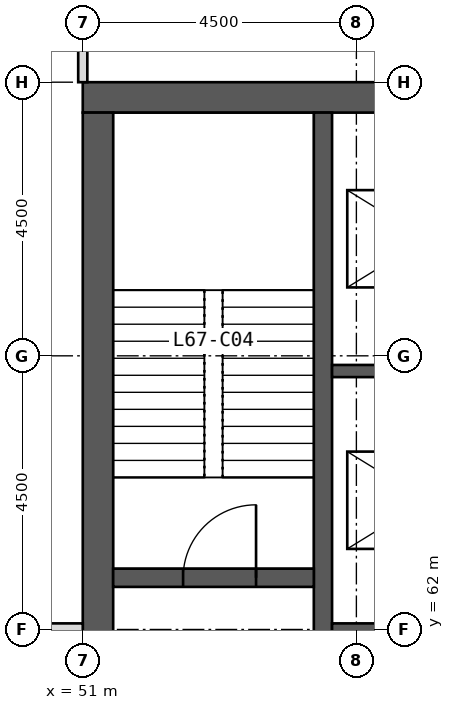
"""IFC4 building model, lengths in metres.
Left out: names, types, materials, properties, quantities, classifications, styles, units other than length and angle.
Written with IfcOpenShell. Run it as: python <this file> out.ifc"""

import sys

from ifc_helpers import new_model, si_unit, direction, frame, frame_2d, origin, place, context, subcontext, project, spatial, rectangle, extrude, element, fill, save


model = new_model("IFC4")
c1 = context("Model", 3, precision=1e-05, world=origin(), true_north=direction((0.0, 1.0)))
c2 = subcontext(c1, "Body", "Model", "MODEL_VIEW")
j1 = project(units=[si_unit("LENGTHUNIT", "METRE"), si_unit("PLANEANGLEUNIT", "RADIAN")], contexts=[c1])
p1 = place(None, origin())
s1 = spatial("IfcSite", under=j1, at=p1, CompositionType="ELEMENT")
p2 = place(p1, origin())
s2 = spatial("IfcBuilding", under=s1, at=p2, CompositionType="ELEMENT")
p3 = place(p2, frame((0.0, 0.0, 278.0)))
s3 = spatial("IfcBuildingStorey", under=s2, at=p3, CompositionType="ELEMENT", Elevation=278.0)
p4 = place(p3, frame((51.0, 70.75, 0.0), z_axis=(0.0, 0.0, 1.0), x_axis=(1.0, 0.0, 0.0)))
e1 = element("IfcWall", 1, at=p4, inside=s3, PredefinedType="SHEAR", context=c2, shape_type="SweptSolid", body=[
    extrude(rectangle(XDim=18.0, YDim=0.5, at=frame_2d((9.0, 0.0))), origin(), (0.0, 0.0, 1.0), 4.0),
])
p5 = place(p4, frame((8.1, 0.0, 0.0)))
e2 = element("IfcOpeningElement", 2, at=p5, cuts=e1, PredefinedType="OPENING", context=c2, shape_type="SweptSolid", body=[
    extrude(rectangle(XDim=1.8, YDim=2.2, at=frame_2d((0.9, 1.1))), frame((0.0, 0.26, 0.0), z_axis=(0.0, -1.0, 0.0), x_axis=(1.0, 0.0, 0.0)), (0.0, 0.0, 1.0), 0.52),
])
p6 = place(p3, frame((51.25, 53.5, 0.0), z_axis=(0.0, 0.0, 1.0), x_axis=(0.0, 1.0, 0.0)))
e3 = element("IfcWall", 3, at=p6, inside=s3, PredefinedType="SHEAR", context=c2, shape_type="SweptSolid", body=[
    extrude(rectangle(XDim=17.0, YDim=0.5, at=frame_2d((8.5, 0.0))), origin(), (0.0, 0.0, 1.0), 4.0),
])
p7 = place(p6, frame((6.1, 0.0, 0.0)))
e4 = element("IfcOpeningElement", 4, at=p7, cuts=e3, PredefinedType="OPENING", context=c2, shape_type="SweptSolid", body=[
    extrude(rectangle(XDim=1.5, YDim=2.2, at=frame_2d((0.75, 1.1))), frame((0.0, 0.26, 0.0), z_axis=(0.0, -1.0, 0.0), x_axis=(1.0, 0.0, 0.0)), (0.0, 0.0, 1.0), 0.52),
])
p8 = place(p3, frame((54.95, 53.5, 0.0), z_axis=(0.0, 0.0, 1.0), x_axis=(0.0, 1.0, 0.0)))
e5 = element("IfcWall", 5, at=p8, inside=s3, PredefinedType="SHEAR", context=c2, shape_type="SweptSolid", body=[
    extrude(rectangle(XDim=17.0, YDim=0.3, at=frame_2d((8.5, 0.0))), origin(), (0.0, 0.0, 1.0), 4.0),
])
for number, where, z_axis, x_axis in (
    (6, (55.1, 62.0, 0.0), (0.0, 0.0, 1.0), (1.0, 0.0, 0.0)),
    (7, (55.1, 66.25, 0.0), (0.0, 0.0, 1.0), (1.0, 0.0, 0.0)),
):
    element("IfcWall", number, at=place(p3, frame(where, z_axis=z_axis, x_axis=x_axis)), inside=s3, PredefinedType="SHEAR", context=c2, shape_type="SweptSolid", body=[
        extrude(rectangle(XDim=3.05, YDim=0.2, at=frame_2d((1.525, 0.0))), origin(), (0.0, 0.0, 1.0), 4.0),
    ])
p9 = place(p3, frame((51.5, 62.85, 0.0), z_axis=(0.0, 0.0, 1.0), x_axis=(1.0, 0.0, 0.0)))
e8 = element("IfcWall", 8, at=p9, inside=s3, PredefinedType="SHEAR", context=c2, shape_type="SweptSolid", body=[
    extrude(rectangle(XDim=3.3, YDim=0.3, at=frame_2d((1.65, 0.0))), origin(), (0.0, 0.0, 1.0), 4.0),
])
p10 = place(p9, frame((1.15, 0.0, 0.0)))
e9 = element("IfcOpeningElement", 9, at=p10, cuts=e8, PredefinedType="OPENING", context=c2, shape_type="SweptSolid", body=[
    extrude(rectangle(XDim=1.2, YDim=2.1, at=frame_2d((0.6, 1.05))), frame((0.0, 0.16, 0.0), z_axis=(0.0, -1.0, 0.0), x_axis=(1.0, 0.0, 0.0)), (0.0, 0.0, 1.0), 0.32),
])
p11 = place(p3, frame((51.0, 71.0, 0.0), z_axis=(0.0, 0.0, 1.0), x_axis=(0.0, 1.0, 0.0)))
e10 = element("IfcWall", 10, at=p11, inside=s3, PredefinedType="PARTITIONING", context=c2, shape_type="SweptSolid", body=[
    extrude(rectangle(XDim=1.5, YDim=0.15, at=frame_2d((0.75, 0.0))), origin(), (0.0, 0.0, 1.0), 3.75),
])
p12 = place(p3, frame((51.0, 62.0, 0.0), z_axis=(0.0, 0.0, 1.0), x_axis=(-1.0, 0.0, 0.0)))
e11 = element("IfcWall", 11, at=p12, inside=s3, PredefinedType="SOLIDWALL", context=c2, shape_type="SweptSolid", body=[
    extrude(rectangle(XDim=1.5, YDim=0.2, at=frame_2d((0.75, 0.0))), origin(), (0.0, 0.0, 1.0), 2.75),
])
p13 = place(p10, origin())
e12 = element("IfcDoor", 12, at=p13, inside=s3, OperationType="SINGLE_SWING_RIGHT", PredefinedType="DOOR", context=c2, shape_type="SweptSolid", body=[
    extrude(rectangle(XDim=1.2, YDim=2.1, at=frame_2d((0.6, 1.05))), frame((0.0, 0.025, 0.0), z_axis=(0.0, -1.0, 0.0), x_axis=(1.0, 0.0, 0.0)), (0.0, 0.0, 1.0), 0.05),
])
fill(e9, e12)
save(model, sys.argv[1])
